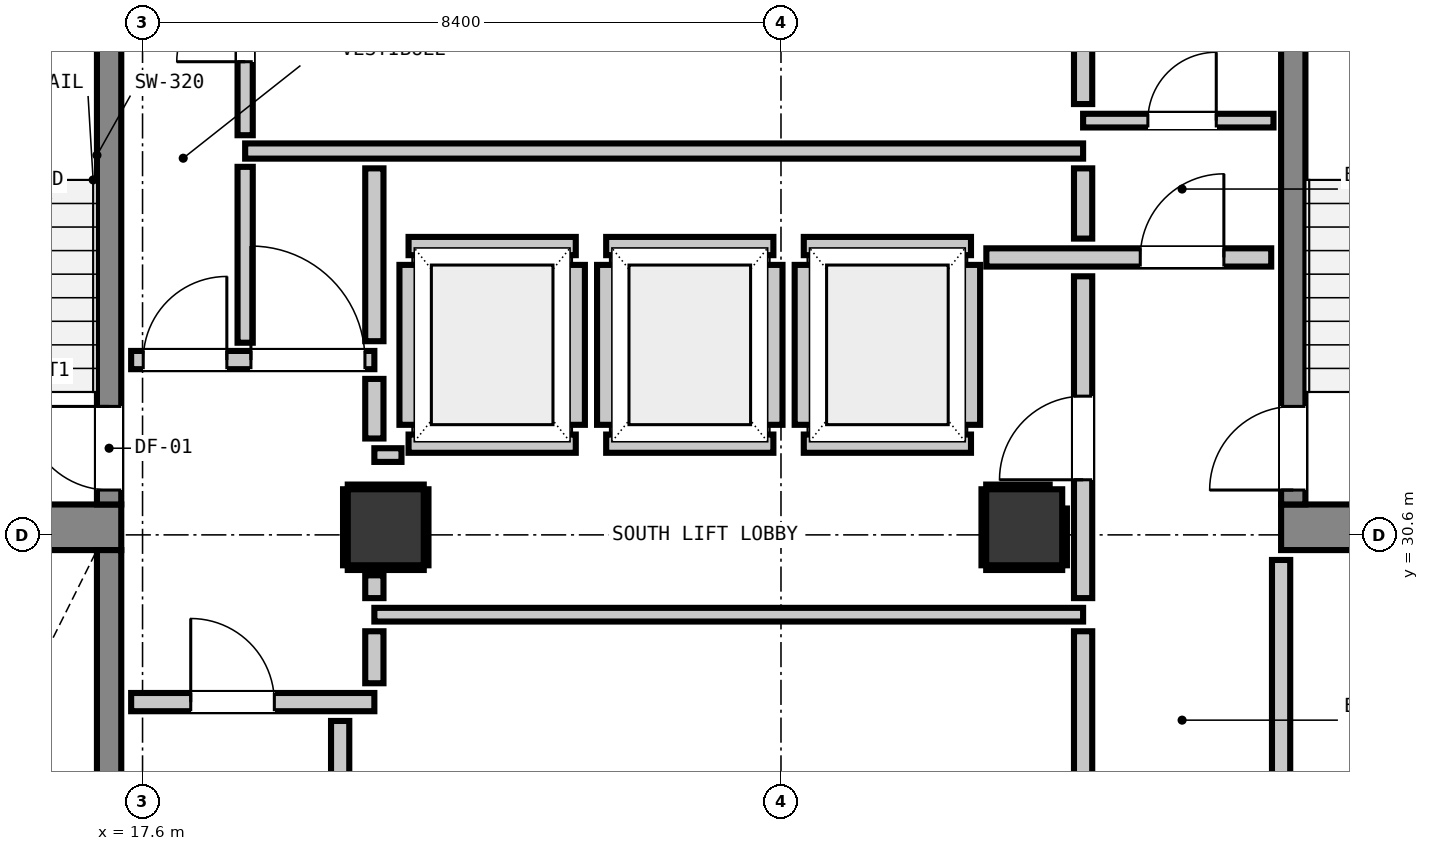
"""IFC4 building model, lengths in metres.
Left out: names, types, materials, properties, quantities, classifications, styles, units other than length and angle.
Written with IfcOpenShell. Run it as: python <this file> out.ifc"""

import sys

from ifc_helpers import new_model, si_unit, direction, frame, frame_2d, origin, origin_2d, place, context, subcontext, project, spatial, rectangle, extrude, element, fill, save


model = new_model("IFC4")
c1 = context("Model", 3, precision=1e-05, world=origin(), true_north=direction((0.0, 1.0)))
c2 = subcontext(c1, "Body", "Model", "MODEL_VIEW")
j1 = project(units=[si_unit("LENGTHUNIT", "METRE"), si_unit("PLANEANGLEUNIT", "RADIAN")], contexts=[c1])
p1 = place(None, origin())
s1 = spatial("IfcSite", under=j1, at=p1, CompositionType="ELEMENT")
p2 = place(p1, origin())
s2 = spatial("IfcBuilding", under=s1, at=p2, CompositionType="ELEMENT")
p3 = place(p2, frame((0.0, 0.0, 96.12)))
s3 = spatial("IfcBuildingStorey", under=s2, at=p3, CompositionType="ELEMENT", Elevation=96.12)
for number, where, z_axis, x_axis in (
    (1, (13.905, 30.7, 0.0), (0.0, 0.0, 1.0), (1.0, 0.0, 0.0)),
    (2, (32.58, 30.7, 0.0), (0.0, 0.0, 1.0), (1.0, 0.0, 0.0)),
):
    element("IfcWall", number, at=place(p3, frame(where, z_axis=z_axis, x_axis=x_axis)), inside=s3, PredefinedType="SHEAR", context=c2, shape_type="SweptSolid", body=[
        extrude(rectangle(XDim=3.415, YDim=0.6, at=frame_2d((1.708, 0.0))), origin(), (0.0, 0.0, 1.0), 3.32),
    ])
p4 = place(p3, frame((17.16, 31.0, 0.0), z_axis=(0.0, 0.0, 1.0), x_axis=(0.0, 1.0, 0.0)))
e3 = element("IfcWall", 3, at=p4, inside=s3, PredefinedType="SHEAR", context=c2, shape_type="SweptSolid", body=[
    extrude(rectangle(XDim=7.8, YDim=0.32, at=frame_2d((3.9, 0.0))), origin(), (0.0, 0.0, 1.0), 3.32),
])
p5 = place(p4, frame((0.19, 0.0, 0.0)))
e4 = element("IfcOpeningElement", 4, at=p5, cuts=e3, PredefinedType="OPENING", context=c2, shape_type="SweptSolid", body=[
    extrude(rectangle(XDim=1.1, YDim=2.15, at=frame_2d((0.55, 1.075))), frame((0.0, 0.17, 0.0), z_axis=(0.0, -1.0, 0.0), x_axis=(1.0, 0.0, 0.0)), (0.0, 0.0, 1.0), 0.34),
])
p6 = place(p3, frame((17.16, 22.5, 0.0), z_axis=(0.0, 0.0, 1.0), x_axis=(0.0, 1.0, 0.0)))
e5 = element("IfcWall", 5, at=p6, inside=s3, PredefinedType="SHEAR", context=c2, shape_type="SweptSolid", body=[
    extrude(rectangle(XDim=7.9, YDim=0.32, at=frame_2d((3.95, 0.0))), origin(), (0.0, 0.0, 1.0), 3.32),
])
p7 = place(p6, frame((0.29, 0.0, 0.0)))
e6 = element("IfcOpeningElement", 6, at=p7, cuts=e5, PredefinedType="OPENING", context=c2, shape_type="SweptSolid", body=[
    extrude(rectangle(XDim=1.1, YDim=2.15, at=frame_2d((0.55, 1.075))), frame((0.0, 0.17, 0.0), z_axis=(0.0, -1.0, 0.0), x_axis=(1.0, 0.0, 0.0)), (0.0, 0.0, 1.0), 0.34),
])
p8 = place(p3, frame((32.74, 31.0, 0.0), z_axis=(0.0, 0.0, 1.0), x_axis=(0.0, 1.0, 0.0)))
e7 = element("IfcWall", 7, at=p8, inside=s3, PredefinedType="SHEAR", context=c2, shape_type="SweptSolid", body=[
    extrude(rectangle(XDim=7.8, YDim=0.32, at=frame_2d((3.9, 0.0))), origin(), (0.0, 0.0, 1.0), 3.32),
])
p9 = place(p8, frame((0.19, 0.0, 0.0)))
e8 = element("IfcOpeningElement", 8, at=p9, cuts=e7, PredefinedType="OPENING", context=c2, shape_type="SweptSolid", body=[
    extrude(rectangle(XDim=1.1, YDim=2.15, at=frame_2d((0.55, 1.075))), frame((0.0, 0.17, 0.0), z_axis=(0.0, -1.0, 0.0), x_axis=(1.0, 0.0, 0.0)), (0.0, 0.0, 1.0), 0.34),
])
for number, where, z_axis, x_axis in (
    (9, (20.8, 30.7, 0.0), (0.0, 0.0, 1.0), (1.0, 0.0, 0.0)),
    (10, (29.2, 30.7, 0.0), (0.0, 0.0, 1.0), (1.0, 0.0, 0.0)),
):
    element("IfcColumn", number, at=place(p3, frame(where, z_axis=z_axis, x_axis=x_axis)), inside=s3, PredefinedType="COLUMN", context=c2, shape_type="SweptSolid", body=[
        extrude(rectangle(XDim=1.0, YDim=1.0, at=origin_2d()), origin(), (0.0, 0.0, 1.0), 3.32),
    ])
for number, where, z_axis, x_axis in (
    (11, (21.1, 31.8, 0.0), (0.0, 0.0, 1.0), (1.0, 0.0, 0.0)),
    (12, (21.1, 34.4, 0.0), (0.0, 0.0, 1.0), (1.0, 0.0, 0.0)),
):
    element("IfcWall", number, at=place(p3, frame(where, z_axis=z_axis, x_axis=x_axis)), inside=s3, PredefinedType="PARTITIONING", context=c2, shape_type="SweptSolid", body=[
        extrude(rectangle(XDim=2.2, YDim=0.24, at=frame_2d((1.1, 0.0))), origin(), (0.0, 0.0, 1.0), 3.06),
    ])
p10 = place(p3, frame((21.1, 32.048, 0.0), z_axis=(0.0, 0.0, 1.0), x_axis=(0.0, 1.0, 0.0)))
e13 = element("IfcWall", 13, at=p10, inside=s3, PredefinedType="PARTITIONING", context=c2, shape_type="SweptSolid", body=[
    extrude(rectangle(XDim=2.104, YDim=0.24, at=frame_2d((1.052, 0.0))), origin(), (0.0, 0.0, 1.0), 2.295),
])
p11 = place(p3, frame((23.3, 32.048, 0.0), z_axis=(0.0, 0.0, 1.0), x_axis=(0.0, 1.0, 0.0)))
e14 = element("IfcWall", 14, at=p11, inside=s3, PredefinedType="PARTITIONING", context=c2, shape_type="SweptSolid", body=[
    extrude(rectangle(XDim=2.104, YDim=0.24, at=frame_2d((1.052, 0.0))), origin(), (0.0, 0.0, 1.0), 3.06),
])
for number, where, z_axis, x_axis in (
    (15, (23.7, 31.8, 0.0), (0.0, 0.0, 1.0), (1.0, 0.0, 0.0)),
    (16, (23.7, 34.4, 0.0), (0.0, 0.0, 1.0), (1.0, 0.0, 0.0)),
):
    element("IfcWall", number, at=place(p3, frame(where, z_axis=z_axis, x_axis=x_axis)), inside=s3, PredefinedType="PARTITIONING", context=c2, shape_type="SweptSolid", body=[
        extrude(rectangle(XDim=2.2, YDim=0.24, at=frame_2d((1.1, 0.0))), origin(), (0.0, 0.0, 1.0), 3.06),
    ])
for number, where, z_axis, x_axis in (
    (17, (23.7, 32.048, 0.0), (0.0, 0.0, 1.0), (0.0, 1.0, 0.0)),
    (18, (25.9, 32.048, 0.0), (0.0, 0.0, 1.0), (0.0, 1.0, 0.0)),
):
    element("IfcWall", number, at=place(p3, frame(where, z_axis=z_axis, x_axis=x_axis)), inside=s3, PredefinedType="PARTITIONING", context=c2, shape_type="SweptSolid", body=[
        extrude(rectangle(XDim=2.104, YDim=0.24, at=frame_2d((1.052, 0.0))), origin(), (0.0, 0.0, 1.0), 3.06),
    ])
for number, where, z_axis, x_axis in (
    (19, (26.3, 31.8, 0.0), (0.0, 0.0, 1.0), (1.0, 0.0, 0.0)),
    (20, (26.3, 34.4, 0.0), (0.0, 0.0, 1.0), (1.0, 0.0, 0.0)),
):
    element("IfcWall", number, at=place(p3, frame(where, z_axis=z_axis, x_axis=x_axis)), inside=s3, PredefinedType="PARTITIONING", context=c2, shape_type="SweptSolid", body=[
        extrude(rectangle(XDim=2.2, YDim=0.24, at=frame_2d((1.1, 0.0))), origin(), (0.0, 0.0, 1.0), 3.06),
    ])
for number, where, z_axis, x_axis in (
    (21, (26.3, 32.048, 0.0), (0.0, 0.0, 1.0), (0.0, 1.0, 0.0)),
    (22, (28.5, 32.048, 0.0), (0.0, 0.0, 1.0), (0.0, 1.0, 0.0)),
):
    element("IfcWall", number, at=place(p3, frame(where, z_axis=z_axis, x_axis=x_axis)), inside=s3, PredefinedType="PARTITIONING", context=c2, shape_type="SweptSolid", body=[
        extrude(rectangle(XDim=2.104, YDim=0.24, at=frame_2d((1.052, 0.0))), origin(), (0.0, 0.0, 1.0), 3.06),
    ])
p12 = place(p3, frame((17.45, 28.4, 0.0), z_axis=(0.0, 0.0, 1.0), x_axis=(1.0, 0.0, 0.0)))
e23 = element("IfcWall", 23, at=p12, inside=s3, PredefinedType="PARTITIONING", context=c2, shape_type="SweptSolid", body=[
    extrude(rectangle(XDim=3.2, YDim=0.24, at=frame_2d((1.6, 0.0))), origin(), (0.0, 0.0, 1.0), 3.06),
])
p13 = place(p12, frame((0.784, 0.0, 0.0)))
e24 = element("IfcOpeningElement", 24, at=p13, cuts=e23, PredefinedType="OPENING", context=c2, shape_type="SweptSolid", body=[
    extrude(rectangle(XDim=1.1, YDim=2.15, at=frame_2d((0.55, 1.075))), frame((0.0, 0.13, 0.0), z_axis=(0.0, -1.0, 0.0), x_axis=(1.0, 0.0, 0.0)), (0.0, 0.0, 1.0), 0.26),
])
p14 = place(p3, frame((17.45, 32.9, 0.0), z_axis=(0.0, 0.0, 1.0), x_axis=(1.0, 0.0, 0.0)))
e25 = element("IfcWall", 25, at=p14, inside=s3, PredefinedType="PARTITIONING", context=c2, shape_type="SweptSolid", body=[
    extrude(rectangle(XDim=3.2, YDim=0.24, at=frame_2d((1.6, 0.0))), origin(), (0.0, 0.0, 1.0), 3.06),
])
p15 = place(p14, frame((0.159, 0.0, 0.0)))
e26 = element("IfcOpeningElement", 26, at=p15, cuts=e25, PredefinedType="OPENING", context=c2, shape_type="SweptSolid", body=[
    extrude(rectangle(XDim=1.1, YDim=2.15, at=frame_2d((0.55, 1.075))), frame((0.0, 0.13, 0.0), z_axis=(0.0, -1.0, 0.0), x_axis=(1.0, 0.0, 0.0)), (0.0, 0.0, 1.0), 0.26),
])
p16 = place(p14, frame((1.576, 0.0, 0.0)))
e27 = element("IfcOpeningElement", 27, at=p16, cuts=e25, PredefinedType="OPENING", context=c2, shape_type="SweptSolid", body=[
    extrude(rectangle(XDim=1.5, YDim=2.15, at=frame_2d((0.75, 1.075))), frame((0.0, 0.13, 0.0), z_axis=(0.0, -1.0, 0.0), x_axis=(1.0, 0.0, 0.0)), (0.0, 0.0, 1.0), 0.26),
])
p17 = place(p3, frame((28.702, 34.25, 0.0), z_axis=(0.0, 0.0, 1.0), x_axis=(1.0, 0.0, 0.0)))
e28 = element("IfcWall", 28, at=p17, inside=s3, PredefinedType="PARTITIONING", context=c2, shape_type="SweptSolid", body=[
    extrude(rectangle(XDim=3.748, YDim=0.24, at=frame_2d((1.874, 0.0))), origin(), (0.0, 0.0, 1.0), 3.06),
])
p18 = place(p17, frame((2.025, 0.0, 0.0)))
e29 = element("IfcOpeningElement", 29, at=p18, cuts=e28, PredefinedType="OPENING", context=c2, shape_type="SweptSolid", body=[
    extrude(rectangle(XDim=1.1, YDim=2.15, at=frame_2d((0.55, 1.075))), frame((0.0, 0.13, 0.0), z_axis=(0.0, -1.0, 0.0), x_axis=(1.0, 0.0, 0.0)), (0.0, 0.0, 1.0), 0.26),
])
p19 = place(p3, frame((18.95, 35.65, 0.0), z_axis=(0.0, 0.0, 1.0), x_axis=(1.0, 0.0, 0.0)))
e30 = element("IfcWall", 30, at=p19, inside=s3, PredefinedType="PARTITIONING", context=c2, shape_type="SweptSolid", body=[
    extrude(rectangle(XDim=11.025, YDim=0.2, at=frame_2d((5.513, 0.0))), origin(), (0.0, 0.0, 1.0), 3.06),
])
p20 = place(p3, frame((20.65, 29.55, 0.0), z_axis=(0.0, 0.0, 1.0), x_axis=(1.0, 0.0, 0.0)))
e31 = element("IfcWall", 31, at=p20, inside=s3, PredefinedType="PARTITIONING", context=c2, shape_type="SweptSolid", body=[
    extrude(rectangle(XDim=9.325, YDim=0.18, at=frame_2d((4.663, 0.0))), origin(), (0.0, 0.0, 1.0), 3.06),
])
p21 = place(p3, frame((20.65, 31.65, 0.0), z_axis=(0.0, 0.0, 1.0), x_axis=(1.0, 0.0, 0.0)))
e32 = element("IfcWall", 32, at=p21, inside=s3, PredefinedType="PARTITIONING", context=c2, shape_type="SweptSolid", body=[
    extrude(rectangle(XDim=0.357, YDim=0.18, at=frame_2d((0.179, 0.0))), origin(), (0.0, 0.0, 1.0), 3.06),
])
p22 = place(p3, frame((29.975, 36.05, 0.0), z_axis=(0.0, 0.0, 1.0), x_axis=(1.0, 0.0, 0.0)))
e33 = element("IfcWall", 33, at=p22, inside=s3, PredefinedType="PARTITIONING", context=c2, shape_type="SweptSolid", body=[
    extrude(rectangle(XDim=2.505, YDim=0.18, at=frame_2d((1.252, 0.0))), origin(), (0.0, 0.0, 1.0), 3.06),
])
p23 = place(p22, frame((0.852, 0.0, 0.0)))
e34 = element("IfcOpeningElement", 34, at=p23, cuts=e33, PredefinedType="OPENING", context=c2, shape_type="SweptSolid", body=[
    extrude(rectangle(XDim=0.9, YDim=2.1, at=frame_2d((0.45, 1.05))), frame((0.0, 0.1, 0.0), z_axis=(0.0, -1.0, 0.0), x_axis=(1.0, 0.0, 0.0)), (0.0, 0.0, 1.0), 0.2),
])
p24 = place(p3, frame((20.2, 22.586, 0.0), z_axis=(0.0, 0.0, 1.0), x_axis=(0.0, 1.0, 0.0)))
e35 = element("IfcWall", 35, at=p24, inside=s3, PredefinedType="PARTITIONING", context=c2, shape_type="SweptSolid", body=[
    extrude(rectangle(XDim=5.566, YDim=0.24, at=frame_2d((2.783, 0.0))), origin(), (0.0, 0.0, 1.0), 3.06),
])
p25 = place(p3, frame((20.65, 28.648, 0.0), z_axis=(0.0, 0.0, 1.0), x_axis=(0.0, 1.0, 0.0)))
e36 = element("IfcWall", 36, at=p25, inside=s3, PredefinedType="PARTITIONING", context=c2, shape_type="SweptSolid", body=[
    extrude(rectangle(XDim=0.684, YDim=0.24, at=frame_2d((0.342, 0.0))), origin(), (0.0, 0.0, 1.0), 2.295),
])
p26 = place(p3, frame((20.65, 29.768, 0.0), z_axis=(0.0, 0.0, 1.0), x_axis=(0.0, 1.0, 0.0)))
e37 = element("IfcWall", 37, at=p26, inside=s3, PredefinedType="PARTITIONING", context=c2, shape_type="SweptSolid", body=[
    extrude(rectangle(XDim=0.3, YDim=0.24, at=frame_2d((0.15, 0.0))), origin(), (0.0, 0.0, 1.0), 2.295),
])
p27 = place(p3, frame((20.65, 31.868, 0.0), z_axis=(0.0, 0.0, 1.0), x_axis=(0.0, 1.0, 0.0)))
e38 = element("IfcWall", 38, at=p27, inside=s3, PredefinedType="PARTITIONING", context=c2, shape_type="SweptSolid", body=[
    extrude(rectangle(XDim=0.784, YDim=0.24, at=frame_2d((0.392, 0.0))), origin(), (0.0, 0.0, 1.0), 2.295),
])
p28 = place(p3, frame((20.65, 33.148, 0.0), z_axis=(0.0, 0.0, 1.0), x_axis=(0.0, 1.0, 0.0)))
e39 = element("IfcWall", 39, at=p28, inside=s3, PredefinedType="PARTITIONING", context=c2, shape_type="SweptSolid", body=[
    extrude(rectangle(XDim=2.274, YDim=0.24, at=frame_2d((1.137, 0.0))), origin(), (0.0, 0.0, 1.0), 2.295),
])
p29 = place(p3, frame((29.975, 25.648, 0.0), z_axis=(0.0, 0.0, 1.0), x_axis=(0.0, 1.0, 0.0)))
e40 = element("IfcWall", 40, at=p29, inside=s3, PredefinedType="PARTITIONING", context=c2, shape_type="SweptSolid", body=[
    extrude(rectangle(XDim=3.684, YDim=0.24, at=frame_2d((1.842, 0.0))), origin(), (0.0, 0.0, 1.0), 3.06),
])
p30 = place(p3, frame((29.975, 29.768, 0.0), z_axis=(0.0, 0.0, 1.0), x_axis=(0.0, 1.0, 0.0)))
e41 = element("IfcWall", 41, at=p30, inside=s3, PredefinedType="PARTITIONING", context=c2, shape_type="SweptSolid", body=[
    extrude(rectangle(XDim=4.234, YDim=0.24, at=frame_2d((2.117, 0.0))), origin(), (0.0, 0.0, 1.0), 3.06),
])
p31 = place(p30, frame((1.557, 0.0, 0.0)))
e42 = element("IfcOpeningElement", 42, at=p31, cuts=e41, PredefinedType="OPENING", context=c2, shape_type="SweptSolid", body=[
    extrude(rectangle(XDim=1.1, YDim=2.15, at=frame_2d((0.55, 1.075))), frame((0.0, 0.13, 0.0), z_axis=(0.0, -1.0, 0.0), x_axis=(1.0, 0.0, 0.0)), (0.0, 0.0, 1.0), 0.26),
])
p32 = place(p3, frame((29.975, 34.498, 0.0), z_axis=(0.0, 0.0, 1.0), x_axis=(0.0, 1.0, 0.0)))
e43 = element("IfcWall", 43, at=p32, inside=s3, PredefinedType="PARTITIONING", context=c2, shape_type="SweptSolid", body=[
    extrude(rectangle(XDim=0.924, YDim=0.24, at=frame_2d((0.462, 0.0))), origin(), (0.0, 0.0, 1.0), 3.06),
])
p33 = place(p3, frame((29.975, 36.268, 0.0), z_axis=(0.0, 0.0, 1.0), x_axis=(0.0, 1.0, 0.0)))
e44 = element("IfcWall", 44, at=p33, inside=s3, PredefinedType="PARTITIONING", context=c2, shape_type="SweptSolid", body=[
    extrude(rectangle(XDim=2.294, YDim=0.24, at=frame_2d((1.147, 0.0))), origin(), (0.0, 0.0, 1.0), 3.06),
])
p34 = place(p3, frame((32.58, 25.648, 0.0), z_axis=(0.0, 0.0, 1.0), x_axis=(0.0, 1.0, 0.0)))
e45 = element("IfcWall", 45, at=p34, inside=s3, PredefinedType="PARTITIONING", context=c2, shape_type="SweptSolid", body=[
    extrude(rectangle(XDim=4.622, YDim=0.24, at=frame_2d((2.311, 0.0))), origin(), (0.0, 0.0, 1.0), 3.06),
])
p35 = place(p3, frame((18.95, 33.128, 0.0), z_axis=(0.0, 0.0, 1.0), x_axis=(0.0, 1.0, 0.0)))
e46 = element("IfcWall", 46, at=p35, inside=s3, PredefinedType="PARTITIONING", context=c2, shape_type="SweptSolid", body=[
    extrude(rectangle(XDim=2.314, YDim=0.2, at=frame_2d((1.157, 0.0))), origin(), (0.0, 0.0, 1.0), 3.06),
])
p36 = place(p3, frame((18.95, 35.858, 0.0), z_axis=(0.0, 0.0, 1.0), x_axis=(0.0, 1.0, 0.0)))
e47 = element("IfcWall", 47, at=p36, inside=s3, PredefinedType="PARTITIONING", context=c2, shape_type="SweptSolid", body=[
    extrude(rectangle(XDim=2.724, YDim=0.2, at=frame_2d((1.362, 0.0))), origin(), (0.0, 0.0, 1.0), 3.06),
])
p37 = place(p36, frame((0.967, 0.0, 0.0)))
e48 = element("IfcOpeningElement", 48, at=p37, cuts=e47, PredefinedType="OPENING", context=c2, shape_type="SweptSolid", body=[
    extrude(rectangle(XDim=0.9, YDim=2.1, at=frame_2d((0.45, 1.05))), frame((0.0, 0.11, 0.0), z_axis=(0.0, -1.0, 0.0), x_axis=(1.0, 0.0, 0.0)), (0.0, 0.0, 1.0), 0.22),
])
for number, where, z_axis, x_axis in (
    (49, (20.3, 30.168, 0.0), (0.0, 0.0, 1.0), (1.0, 0.0, 0.0)),
    (50, (20.3, 31.232, 0.0), (0.0, 0.0, 1.0), (1.0, 0.0, 0.0)),
    (51, (20.268, 30.2, 0.0), (0.0, 0.0, 1.0), (0.0, 1.0, 0.0)),
    (52, (21.332, 30.2, 0.0), (0.0, 0.0, 1.0), (0.0, 1.0, 0.0)),
    (53, (28.7, 30.168, 0.0), (0.0, 0.0, 1.0), (1.0, 0.0, 0.0)),
):
    element("IfcWall", number, at=place(p3, frame(where, z_axis=z_axis, x_axis=x_axis)), inside=s3, PredefinedType="PARTITIONING", context=c2, shape_type="SweptSolid", body=[
        extrude(rectangle(XDim=1.0, YDim=0.06, at=frame_2d((0.5, 0.0))), origin(), (0.0, 0.0, 1.0), 1.45),
    ])
p38 = place(p3, frame((28.7, 31.232, 0.0), z_axis=(0.0, 0.0, 1.0), x_axis=(1.0, 0.0, 0.0)))
e54 = element("IfcWall", 54, at=p38, inside=s3, PredefinedType="PARTITIONING", context=c2, shape_type="SweptSolid", body=[
    extrude(rectangle(XDim=0.835, YDim=0.06, at=frame_2d((0.417, 0.0))), origin(), (0.0, 0.0, 1.0), 1.45),
])
p39 = place(p3, frame((28.668, 30.2, 0.0), z_axis=(0.0, 0.0, 1.0), x_axis=(0.0, 1.0, 0.0)))
e55 = element("IfcWall", 55, at=p39, inside=s3, PredefinedType="PARTITIONING", context=c2, shape_type="SweptSolid", body=[
    extrude(rectangle(XDim=1.0, YDim=0.06, at=frame_2d((0.5, 0.0))), origin(), (0.0, 0.0, 1.0), 1.45),
])
p40 = place(p3, frame((29.732, 30.2, 0.0), z_axis=(0.0, 0.0, 1.0), x_axis=(0.0, 1.0, 0.0)))
e56 = element("IfcWall", 56, at=p40, inside=s3, PredefinedType="PARTITIONING", context=c2, shape_type="SweptSolid", body=[
    extrude(rectangle(XDim=0.747, YDim=0.06, at=frame_2d((0.374, 0.0))), origin(), (0.0, 0.0, 1.0), 1.45),
])
p41 = place(p5, origin())
e57 = element("IfcDoor", 57, at=p41, inside=s3, OperationType="SINGLE_SWING_RIGHT", PredefinedType="DOOR", context=c2, shape_type="SweptSolid", body=[
    extrude(rectangle(XDim=1.1, YDim=2.15, at=frame_2d((0.55, 1.075))), frame((0.0, 0.025, 0.0), z_axis=(0.0, -1.0, 0.0), x_axis=(1.0, 0.0, 0.0)), (0.0, 0.0, 1.0), 0.05),
])
fill(e4, e57)
p42 = place(p9, origin())
e58 = element("IfcDoor", 58, at=p42, inside=s3, OperationType="SINGLE_SWING_LEFT", PredefinedType="DOOR", context=c2, shape_type="SweptSolid", body=[
    extrude(rectangle(XDim=1.1, YDim=2.15, at=frame_2d((0.55, 1.075))), frame((0.0, 0.025, 0.0), z_axis=(0.0, -1.0, 0.0), x_axis=(1.0, 0.0, 0.0)), (0.0, 0.0, 1.0), 0.05),
])
fill(e8, e58)
p43 = place(p13, origin())
e59 = element("IfcDoor", 59, at=p43, inside=s3, OperationType="SINGLE_SWING_LEFT", PredefinedType="DOOR", context=c2, shape_type="SweptSolid", body=[
    extrude(rectangle(XDim=1.1, YDim=2.15, at=frame_2d((0.55, 1.075))), frame((0.0, 0.025, 0.0), z_axis=(0.0, -1.0, 0.0), x_axis=(1.0, 0.0, 0.0)), (0.0, 0.0, 1.0), 0.05),
])
fill(e24, e59)
p44 = place(p15, origin())
e60 = element("IfcDoor", 60, at=p44, inside=s3, OperationType="SINGLE_SWING_RIGHT", PredefinedType="DOOR", context=c2, shape_type="SweptSolid", body=[
    extrude(rectangle(XDim=1.1, YDim=2.15, at=frame_2d((0.55, 1.075))), frame((0.0, 0.025, 0.0), z_axis=(0.0, -1.0, 0.0), x_axis=(1.0, 0.0, 0.0)), (0.0, 0.0, 1.0), 0.05),
])
fill(e26, e60)
p45 = place(p31, origin())
e61 = element("IfcDoor", 61, at=p45, inside=s3, OperationType="SINGLE_SWING_LEFT", PredefinedType="DOOR", context=c2, shape_type="SweptSolid", body=[
    extrude(rectangle(XDim=1.1, YDim=2.15, at=frame_2d((0.55, 1.075))), frame((0.0, 0.025, 0.0), z_axis=(0.0, -1.0, 0.0), x_axis=(1.0, 0.0, 0.0)), (0.0, 0.0, 1.0), 0.05),
])
fill(e42, e61)
p46 = place(p18, origin())
e62 = element("IfcDoor", 62, at=p46, inside=s3, OperationType="SINGLE_SWING_RIGHT", PredefinedType="DOOR", context=c2, shape_type="SweptSolid", body=[
    extrude(rectangle(XDim=1.1, YDim=2.15, at=frame_2d((0.55, 1.075))), frame((0.0, 0.025, 0.0), z_axis=(0.0, -1.0, 0.0), x_axis=(1.0, 0.0, 0.0)), (0.0, 0.0, 1.0), 0.05),
])
fill(e29, e62)
p47 = place(p16, origin())
e63 = element("IfcDoor", 63, at=p47, inside=s3, OperationType="SINGLE_SWING_LEFT", PredefinedType="DOOR", context=c2, shape_type="SweptSolid", body=[
    extrude(rectangle(XDim=1.5, YDim=2.15, at=frame_2d((0.75, 1.075))), frame((0.0, 0.025, 0.0), z_axis=(0.0, -1.0, 0.0), x_axis=(1.0, 0.0, 0.0)), (0.0, 0.0, 1.0), 0.05),
])
fill(e27, e63)
p48 = place(p23, origin())
e64 = element("IfcDoor", 64, at=p48, inside=s3, OperationType="SINGLE_SWING_RIGHT", PredefinedType="DOOR", context=c2, shape_type="SweptSolid", body=[
    extrude(rectangle(XDim=0.9, YDim=2.1, at=frame_2d((0.45, 1.05))), frame((0.0, 0.025, 0.0), z_axis=(0.0, -1.0, 0.0), x_axis=(1.0, 0.0, 0.0)), (0.0, 0.0, 1.0), 0.05),
])
fill(e34, e64)
p49 = place(p37, origin())
e65 = element("IfcDoor", 65, at=p49, inside=s3, OperationType="SINGLE_SWING_LEFT", PredefinedType="DOOR", context=c2, shape_type="SweptSolid", body=[
    extrude(rectangle(XDim=0.9, YDim=2.1, at=frame_2d((0.45, 1.05))), frame((0.0, 0.025, 0.0), z_axis=(0.0, -1.0, 0.0), x_axis=(1.0, 0.0, 0.0)), (0.0, 0.0, 1.0), 0.05),
])
fill(e48, e65)
save(model, sys.argv[1])
